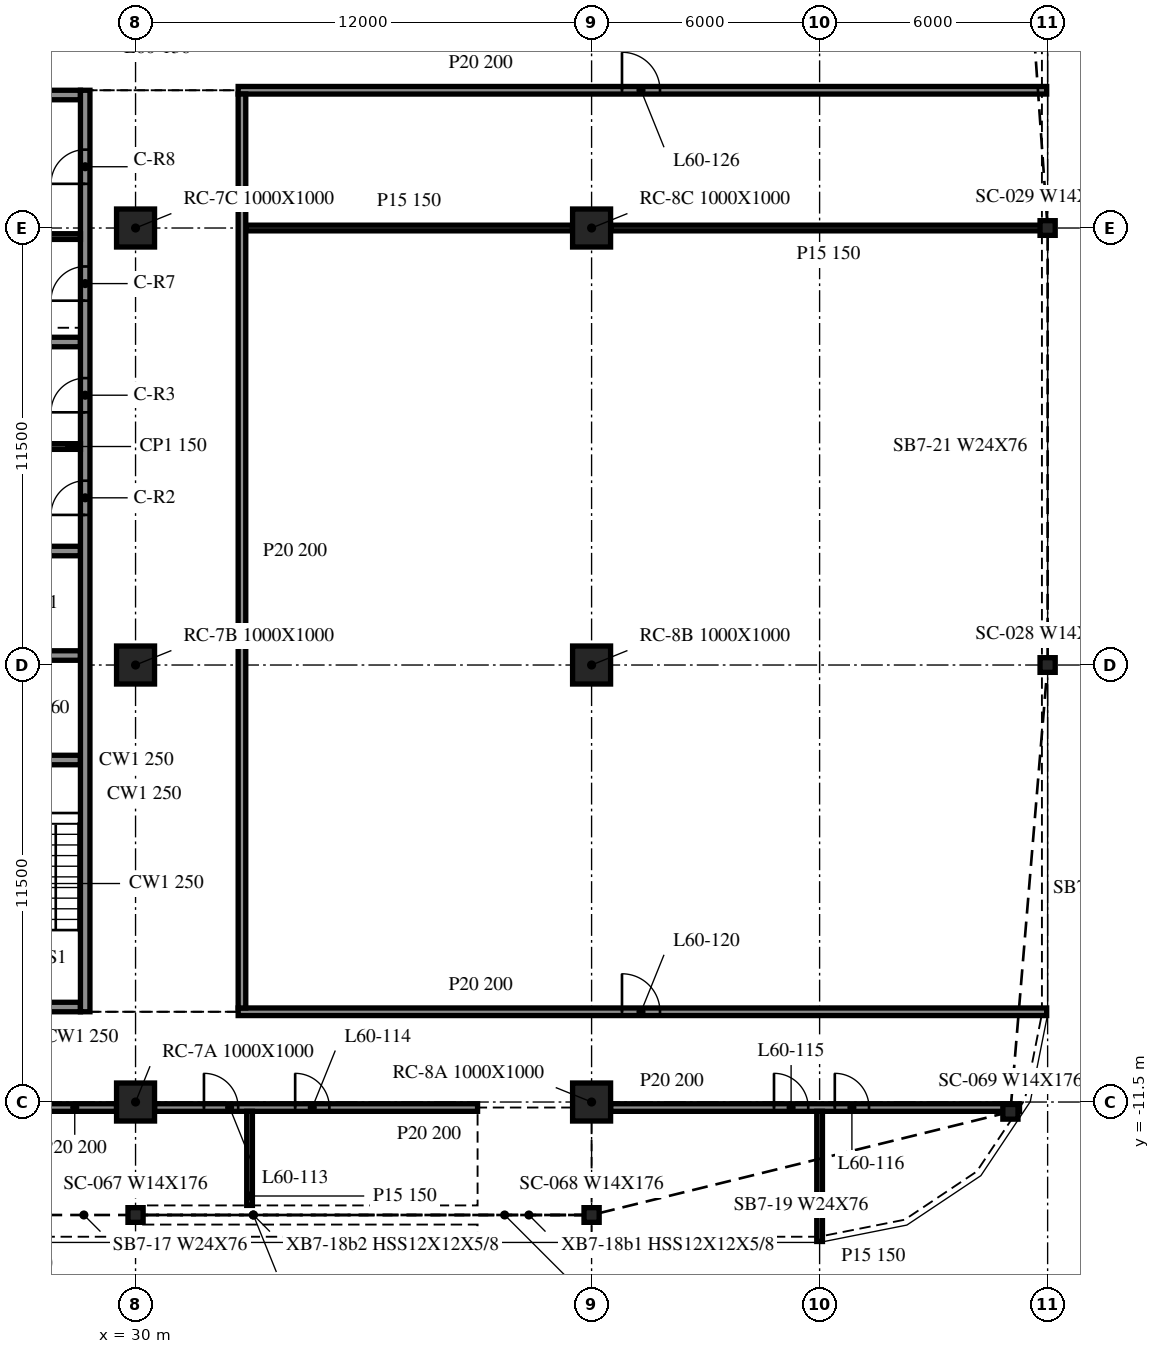
"""IFC4 building model, lengths in metres.
Left out: names, types, materials, properties, quantities, classifications, styles, units other than length and angle.
Written with IfcOpenShell. Run it as: python <this file> out.ifc"""

import sys

from ifc_helpers import new_model, si_unit, direction, frame, frame_2d, origin, origin_2d, place, context, subcontext, project, spatial, rectangle, i_section, extrude, element, fill, save


model = new_model("IFC4")
c1 = context("Model", 3, precision=1e-05, world=origin(), true_north=direction((0.0, 1.0)))
c2 = subcontext(c1, "Body", "Model", "MODEL_VIEW")
j1 = project(units=[si_unit("LENGTHUNIT", "METRE"), si_unit("PLANEANGLEUNIT", "RADIAN")], contexts=[c1])
p1 = place(None, origin())
s1 = spatial("IfcSite", under=j1, at=p1, CompositionType="ELEMENT")
p2 = place(p1, origin())
s2 = spatial("IfcBuilding", under=s1, at=p2, CompositionType="ELEMENT")
p3 = place(p2, frame((0.0, 0.0, 247.6)))
s3 = spatial("IfcBuildingStorey", under=s2, at=p3, CompositionType="ELEMENT", Elevation=247.6)
for number, where, z_axis, x_axis in (
    (1, (30.0, -11.5, -0.34), (0.0, 0.0, 1.0), (1.0, 0.0, 0.0)),
    (2, (30.0, 0.0, -0.34), (0.0, 0.0, 1.0), (1.0, 0.0, 0.0)),
    (3, (30.0, 11.5, -0.34), (0.0, 0.0, 1.0), (1.0, 0.0, 0.0)),
    (4, (42.0, -11.5, -0.34), (0.0, 0.0, 1.0), (1.0, 0.0, 0.0)),
    (5, (42.0, 0.0, -0.34), (0.0, 0.0, 1.0), (1.0, 0.0, 0.0)),
    (6, (42.0, 11.5, -0.34), (0.0, 0.0, 1.0), (1.0, 0.0, 0.0)),
):
    element("IfcColumn", number, at=place(p3, frame(where, z_axis=z_axis, x_axis=x_axis)), inside=s3, PredefinedType="COLUMN", context=c2, shape_type="SweptSolid", body=[
        extrude(rectangle(XDim=1.0, YDim=1.0, at=origin_2d()), origin(), (0.0, 0.0, 1.0), 3.8),
    ])
for number, where, z_axis, x_axis in (
    (7, (30.0, -14.473, -0.34), (0.0, 0.0, 1.0), (1.0, 0.0, 0.0)),
    (8, (42.0, -14.473, -0.34), (0.0, 0.0, 1.0), (1.0, 0.0, 0.0)),
    (9, (53.021, -11.758, -0.34), (0.0, 0.0, 1.0), (1.0, 0.0, 0.0)),
    (10, (54.0, 0.0, -0.34), (0.0, 0.0, 1.0), (1.0, 0.0, 0.0)),
    (11, (54.0, 11.5, -0.34), (0.0, 0.0, 1.0), (1.0, 0.0, 0.0)),
):
    element("IfcColumn", number, at=place(p3, frame(where, z_axis=z_axis, x_axis=x_axis)), inside=s3, PredefinedType="COLUMN", context=c2, shape_type="SweptSolid", body=[
        extrude(i_section(OverallWidth=0.399, OverallDepth=0.386, WebThickness=0.021, FlangeThickness=0.033, at=origin_2d()), origin(), (0.0, 0.0, 1.0), 3.8),
    ])
p4 = place(p3, frame((28.675, -9.125, 0.0), z_axis=(0.0, 0.0, 1.0), x_axis=(0.0, 1.0, 0.0)))
e12 = element("IfcWall", 12, at=p4, inside=s3, PredefinedType="SOLIDWALL", context=c2, shape_type="SweptSolid", body=[
    extrude(rectangle(XDim=24.25, YDim=0.25, at=frame_2d((12.125, 0.0))), origin(), (0.0, 0.0, 1.0), 3.46),
])
p5 = place(p4, frame((13.075, 0.0, 0.0)))
e13 = element("IfcOpeningElement", 13, at=p5, cuts=e12, PredefinedType="OPENING", context=c2, shape_type="SweptSolid", body=[
    extrude(rectangle(XDim=0.9, YDim=2.1, at=frame_2d((0.45, 1.05))), frame((0.0, 0.135, 0.0), z_axis=(0.0, -1.0, 0.0), x_axis=(1.0, 0.0, 0.0)), (0.0, 0.0, 1.0), 0.27),
])
p6 = place(p4, frame((15.775, 0.0, 0.0)))
e14 = element("IfcOpeningElement", 14, at=p6, cuts=e12, PredefinedType="OPENING", context=c2, shape_type="SweptSolid", body=[
    extrude(rectangle(XDim=0.9, YDim=2.1, at=frame_2d((0.45, 1.05))), frame((0.0, 0.135, 0.0), z_axis=(0.0, -1.0, 0.0), x_axis=(1.0, 0.0, 0.0)), (0.0, 0.0, 1.0), 0.27),
])
p7 = place(p4, frame((18.712, 0.0, 0.0)))
e15 = element("IfcOpeningElement", 15, at=p7, cuts=e12, PredefinedType="OPENING", context=c2, shape_type="SweptSolid", body=[
    extrude(rectangle(XDim=0.9, YDim=2.1, at=frame_2d((0.45, 1.05))), frame((0.0, 0.135, 0.0), z_axis=(0.0, -1.0, 0.0), x_axis=(1.0, 0.0, 0.0)), (0.0, 0.0, 1.0), 0.27),
])
p8 = place(p4, frame((21.788, 0.0, 0.0)))
e16 = element("IfcOpeningElement", 16, at=p8, cuts=e12, PredefinedType="OPENING", context=c2, shape_type="SweptSolid", body=[
    extrude(rectangle(XDim=0.9, YDim=2.1, at=frame_2d((0.45, 1.05))), frame((0.0, 0.135, 0.0), z_axis=(0.0, -1.0, 0.0), x_axis=(1.0, 0.0, 0.0)), (0.0, 0.0, 1.0), 0.27),
])
p9 = place(p3, frame((28.55, -9.0, 0.0), z_axis=(0.0, 0.0, 1.0), x_axis=(-1.0, 0.0, 0.0)))
e17 = element("IfcWall", 17, at=p9, inside=s3, PredefinedType="SOLIDWALL", context=c2, shape_type="SweptSolid", body=[
    extrude(rectangle(XDim=9.1, YDim=0.25, at=frame_2d((4.55, 0.0))), origin(), (0.0, 0.0, 1.0), 3.46),
])
p10 = place(p9, frame((3.65, 0.0, 0.0)))
e18 = element("IfcOpeningElement", 18, at=p10, cuts=e17, PredefinedType="OPENING", context=c2, shape_type="SweptSolid", body=[
    extrude(rectangle(XDim=1.8, YDim=2.1, at=frame_2d((0.9, 1.05))), frame((0.0, 0.135, 0.0), z_axis=(0.0, -1.0, 0.0), x_axis=(1.0, 0.0, 0.0)), (0.0, 0.0, 1.0), 0.27),
])
p11 = place(p3, frame((19.45, 15.0, 0.0), z_axis=(0.0, 0.0, 1.0), x_axis=(1.0, 0.0, 0.0)))
e19 = element("IfcWall", 19, at=p11, inside=s3, PredefinedType="SOLIDWALL", context=c2, shape_type="SweptSolid", body=[
    extrude(rectangle(XDim=9.1, YDim=0.25, at=frame_2d((4.55, 0.0))), origin(), (0.0, 0.0, 1.0), 3.46),
])
p12 = place(p11, frame((3.65, 0.0, 0.0)))
e20 = element("IfcOpeningElement", 20, at=p12, cuts=e19, PredefinedType="OPENING", context=c2, shape_type="SweptSolid", body=[
    extrude(rectangle(XDim=1.8, YDim=2.1, at=frame_2d((0.9, 1.05))), frame((0.0, 0.135, 0.0), z_axis=(0.0, -1.0, 0.0), x_axis=(1.0, 0.0, 0.0)), (0.0, 0.0, 1.0), 0.27),
])
for number, where, z_axis, x_axis in (
    (21, (25.7, -2.5, 0.0), (0.0, 0.0, 1.0), (1.0, 0.0, 0.0)),
    (22, (25.7, 0.25, 0.0), (0.0, 0.0, 1.0), (1.0, 0.0, 0.0)),
    (23, (25.7, 3.0, 0.0), (0.0, 0.0, 1.0), (1.0, 0.0, 0.0)),
    (24, (25.7, 8.5, 0.0), (0.0, 0.0, 1.0), (1.0, 0.0, 0.0)),
):
    element("IfcWall", number, at=place(p3, frame(where, z_axis=z_axis, x_axis=x_axis)), inside=s3, PredefinedType="SOLIDWALL", context=c2, shape_type="SweptSolid", body=[
        extrude(rectangle(XDim=2.85, YDim=0.25, at=frame_2d((1.425, 0.0))), origin(), (0.0, 0.0, 1.0), 3.46),
    ])
for number, where, z_axis, x_axis in (
    (25, (25.7, 5.75, 0.0), (0.0, 0.0, 1.0), (1.0, 0.0, 0.0)),
    (26, (25.7, 11.275, 0.0), (0.0, 0.0, 1.0), (1.0, 0.0, 0.0)),
):
    element("IfcWall", number, at=place(p3, frame(where, z_axis=z_axis, x_axis=x_axis)), inside=s3, PredefinedType="PARTITIONING", context=c2, shape_type="SweptSolid", body=[
        extrude(rectangle(XDim=2.85, YDim=0.15, at=frame_2d((1.425, 0.0))), origin(), (0.0, 0.0, 1.0), 3.46),
    ])
p13 = place(p3, frame((18.5, -11.645, 0.0), z_axis=(0.0, 0.0, 1.0), x_axis=(1.0, 0.0, 0.0)))
e27 = element("IfcWall", 27, at=p13, inside=s3, PredefinedType="PARTITIONING", context=c2, shape_type="SweptSolid", body=[
    extrude(rectangle(XDim=11.0, YDim=0.2, at=frame_2d((5.5, 0.0))), origin(), (0.0, 0.0, 1.0), 3.46),
])
p14 = place(p13, frame((1.3, 0.0, 0.0)))
e28 = element("IfcOpeningElement", 28, at=p14, cuts=e27, PredefinedType="OPENING", context=c2, shape_type="SweptSolid", body=[
    extrude(rectangle(XDim=0.9, YDim=2.1, at=frame_2d((0.45, 1.05))), frame((0.0, 0.11, 0.0), z_axis=(0.0, -1.0, 0.0), x_axis=(1.0, 0.0, 0.0)), (0.0, 0.0, 1.0), 0.22),
])
p15 = place(p13, frame((5.1, 0.0, 0.0)))
e29 = element("IfcOpeningElement", 29, at=p15, cuts=e27, PredefinedType="OPENING", context=c2, shape_type="SweptSolid", body=[
    extrude(rectangle(XDim=0.9, YDim=2.1, at=frame_2d((0.45, 1.05))), frame((0.0, 0.11, 0.0), z_axis=(0.0, -1.0, 0.0), x_axis=(1.0, 0.0, 0.0)), (0.0, 0.0, 1.0), 0.22),
])
p16 = place(p3, frame((30.5, -11.645, 0.0), z_axis=(0.0, 0.0, 1.0), x_axis=(1.0, 0.0, 0.0)))
e30 = element("IfcWall", 30, at=p16, inside=s3, PredefinedType="PARTITIONING", context=c2, shape_type="SweptSolid", body=[
    extrude(rectangle(XDim=8.5, YDim=0.2, at=frame_2d((4.25, 0.0))), origin(), (0.0, 0.0, 1.0), 3.46),
])
p17 = place(p16, frame((1.3, 0.0, 0.0)))
e31 = element("IfcOpeningElement", 31, at=p17, cuts=e30, PredefinedType="OPENING", context=c2, shape_type="SweptSolid", body=[
    extrude(rectangle(XDim=0.9, YDim=2.1, at=frame_2d((0.45, 1.05))), frame((0.0, 0.11, 0.0), z_axis=(0.0, -1.0, 0.0), x_axis=(1.0, 0.0, 0.0)), (0.0, 0.0, 1.0), 0.22),
])
p18 = place(p16, frame((3.7, 0.0, 0.0)))
e32 = element("IfcOpeningElement", 32, at=p18, cuts=e30, PredefinedType="OPENING", context=c2, shape_type="SweptSolid", body=[
    extrude(rectangle(XDim=0.9, YDim=2.1, at=frame_2d((0.45, 1.05))), frame((0.0, 0.11, 0.0), z_axis=(0.0, -1.0, 0.0), x_axis=(1.0, 0.0, 0.0)), (0.0, 0.0, 1.0), 0.22),
])
p19 = place(p3, frame((42.5, -11.645, 0.0), z_axis=(0.0, 0.0, 1.0), x_axis=(1.0, 0.0, 0.0)))
e33 = element("IfcWall", 33, at=p19, inside=s3, PredefinedType="PARTITIONING", context=c2, shape_type="SweptSolid", body=[
    extrude(rectangle(XDim=10.76, YDim=0.2, at=frame_2d((5.38, 0.0))), origin(), (0.0, 0.0, 1.0), 3.46),
])
p20 = place(p19, frame((4.3, 0.0, 0.0)))
e34 = element("IfcOpeningElement", 34, at=p20, cuts=e33, PredefinedType="OPENING", context=c2, shape_type="SweptSolid", body=[
    extrude(rectangle(XDim=0.9, YDim=2.1, at=frame_2d((0.45, 1.05))), frame((0.0, 0.11, 0.0), z_axis=(0.0, -1.0, 0.0), x_axis=(1.0, 0.0, 0.0)), (0.0, 0.0, 1.0), 0.22),
])
p21 = place(p19, frame((5.9, 0.0, 0.0)))
e35 = element("IfcOpeningElement", 35, at=p21, cuts=e33, PredefinedType="OPENING", context=c2, shape_type="SweptSolid", body=[
    extrude(rectangle(XDim=0.9, YDim=2.1, at=frame_2d((0.45, 1.05))), frame((0.0, 0.11, 0.0), z_axis=(0.0, -1.0, 0.0), x_axis=(1.0, 0.0, 0.0)), (0.0, 0.0, 1.0), 0.22),
])
p22 = place(p3, frame((32.7, -9.125, 0.0), z_axis=(0.0, 0.0, 1.0), x_axis=(1.0, 0.0, 0.0)))
e36 = element("IfcWall", 36, at=p22, inside=s3, PredefinedType="PARTITIONING", context=c2, shape_type="SweptSolid", body=[
    extrude(rectangle(XDim=21.275, YDim=0.2, at=frame_2d((10.638, 0.0))), origin(), (0.0, 0.0, 1.0), 3.46),
])
p23 = place(p22, frame((10.1, 0.0, 0.0)))
e37 = element("IfcOpeningElement", 37, at=p23, cuts=e36, PredefinedType="OPENING", context=c2, shape_type="SweptSolid", body=[
    extrude(rectangle(XDim=1.0, YDim=2.1, at=frame_2d((0.5, 1.05))), frame((0.0, 0.11, 0.0), z_axis=(0.0, -1.0, 0.0), x_axis=(1.0, 0.0, 0.0)), (0.0, 0.0, 1.0), 0.22),
])
p24 = place(p3, frame((32.9, 11.5, 0.0), z_axis=(0.0, 0.0, 1.0), x_axis=(1.0, 0.0, 0.0)))
e38 = element("IfcWall", 38, at=p24, inside=s3, PredefinedType="PARTITIONING", context=c2, shape_type="SweptSolid", body=[
    extrude(rectangle(XDim=8.6, YDim=0.15, at=frame_2d((4.3, 0.0))), origin(), (0.0, 0.0, 1.0), 3.46),
])
p25 = place(p3, frame((42.5, 11.5, 0.0), z_axis=(0.0, 0.0, 1.0), x_axis=(1.0, 0.0, 0.0)))
e39 = element("IfcWall", 39, at=p25, inside=s3, PredefinedType="PARTITIONING", context=c2, shape_type="SweptSolid", body=[
    extrude(rectangle(XDim=11.475, YDim=0.15, at=frame_2d((5.738, 0.0))), origin(), (0.0, 0.0, 1.0), 3.46),
])
p26 = place(p3, frame((32.7, 15.125, 0.0), z_axis=(0.0, 0.0, 1.0), x_axis=(1.0, 0.0, 0.0)))
e40 = element("IfcWall", 40, at=p26, inside=s3, PredefinedType="PARTITIONING", context=c2, shape_type="SweptSolid", body=[
    extrude(rectangle(XDim=21.275, YDim=0.2, at=frame_2d((10.638, 0.0))), origin(), (0.0, 0.0, 1.0), 3.46),
])
p27 = place(p26, frame((10.1, 0.0, 0.0)))
e41 = element("IfcOpeningElement", 41, at=p27, cuts=e40, PredefinedType="OPENING", context=c2, shape_type="SweptSolid", body=[
    extrude(rectangle(XDim=1.0, YDim=2.1, at=frame_2d((0.5, 1.05))), frame((0.0, 0.11, 0.0), z_axis=(0.0, -1.0, 0.0), x_axis=(1.0, 0.0, 0.0)), (0.0, 0.0, 1.0), 0.22),
])
p28 = place(p3, frame((32.8, -9.025, 0.0), z_axis=(0.0, 0.0, 1.0), x_axis=(0.0, 1.0, 0.0)))
e42 = element("IfcWall", 42, at=p28, inside=s3, PredefinedType="PARTITIONING", context=c2, shape_type="SweptSolid", body=[
    extrude(rectangle(XDim=24.05, YDim=0.2, at=frame_2d((12.025, 0.0))), origin(), (0.0, 0.0, 1.0), 3.46),
])
p29 = place(p3, frame((33.0, -14.221, 0.0), z_axis=(0.0, 0.0, 1.0), x_axis=(0.0, 1.0, 0.0)))
e43 = element("IfcWall", 43, at=p29, inside=s3, PredefinedType="PARTITIONING", context=c2, shape_type="SweptSolid", body=[
    extrude(rectangle(XDim=2.476, YDim=0.15, at=frame_2d((1.238, 0.0))), origin(), (0.0, 0.0, 1.0), 3.46),
])
p30 = place(p3, frame((48.0, -15.17, 0.0), z_axis=(0.0, 0.0, 1.0), x_axis=(0.0, 1.0, 0.0)))
e44 = element("IfcWall", 44, at=p30, inside=s3, PredefinedType="PARTITIONING", context=c2, shape_type="SweptSolid", body=[
    extrude(rectangle(XDim=3.425, YDim=0.15, at=frame_2d((1.712, 0.0))), origin(), (0.0, 0.0, 1.0), 3.46),
])
p31 = place(p5, origin())
e45 = element("IfcDoor", 45, at=p31, inside=s3, OperationType="SINGLE_SWING_RIGHT", PredefinedType="DOOR", context=c2, shape_type="SweptSolid", body=[
    extrude(rectangle(XDim=0.9, YDim=2.1, at=frame_2d((0.45, 1.05))), frame((0.0, 0.025, 0.0), z_axis=(0.0, -1.0, 0.0), x_axis=(1.0, 0.0, 0.0)), (0.0, 0.0, 1.0), 0.05),
])
fill(e13, e45)
p32 = place(p6, origin())
e46 = element("IfcDoor", 46, at=p32, inside=s3, OperationType="SINGLE_SWING_LEFT", PredefinedType="DOOR", context=c2, shape_type="SweptSolid", body=[
    extrude(rectangle(XDim=0.9, YDim=2.1, at=frame_2d((0.45, 1.05))), frame((0.0, 0.025, 0.0), z_axis=(0.0, -1.0, 0.0), x_axis=(1.0, 0.0, 0.0)), (0.0, 0.0, 1.0), 0.05),
])
fill(e14, e46)
p33 = place(p7, origin())
e47 = element("IfcDoor", 47, at=p33, inside=s3, OperationType="SINGLE_SWING_LEFT", PredefinedType="DOOR", context=c2, shape_type="SweptSolid", body=[
    extrude(rectangle(XDim=0.9, YDim=2.1, at=frame_2d((0.45, 1.05))), frame((0.0, 0.025, 0.0), z_axis=(0.0, -1.0, 0.0), x_axis=(1.0, 0.0, 0.0)), (0.0, 0.0, 1.0), 0.05),
])
fill(e15, e47)
p34 = place(p8, origin())
e48 = element("IfcDoor", 48, at=p34, inside=s3, OperationType="SINGLE_SWING_RIGHT", PredefinedType="DOOR", context=c2, shape_type="SweptSolid", body=[
    extrude(rectangle(XDim=0.9, YDim=2.1, at=frame_2d((0.45, 1.05))), frame((0.0, 0.025, 0.0), z_axis=(0.0, -1.0, 0.0), x_axis=(1.0, 0.0, 0.0)), (0.0, 0.0, 1.0), 0.05),
])
fill(e16, e48)
p35 = place(p17, origin())
e49 = element("IfcDoor", 49, at=p35, inside=s3, OperationType="SINGLE_SWING_RIGHT", PredefinedType="DOOR", context=c2, shape_type="SweptSolid", body=[
    extrude(rectangle(XDim=0.9, YDim=2.1, at=frame_2d((0.45, 1.05))), frame((0.0, 0.025, 0.0), z_axis=(0.0, -1.0, 0.0), x_axis=(1.0, 0.0, 0.0)), (0.0, 0.0, 1.0), 0.05),
])
fill(e31, e49)
p36 = place(p18, origin())
e50 = element("IfcDoor", 50, at=p36, inside=s3, OperationType="SINGLE_SWING_RIGHT", PredefinedType="DOOR", context=c2, shape_type="SweptSolid", body=[
    extrude(rectangle(XDim=0.9, YDim=2.1, at=frame_2d((0.45, 1.05))), frame((0.0, 0.025, 0.0), z_axis=(0.0, -1.0, 0.0), x_axis=(1.0, 0.0, 0.0)), (0.0, 0.0, 1.0), 0.05),
])
fill(e32, e50)
p37 = place(p20, origin())
e51 = element("IfcDoor", 51, at=p37, inside=s3, OperationType="SINGLE_SWING_RIGHT", PredefinedType="DOOR", context=c2, shape_type="SweptSolid", body=[
    extrude(rectangle(XDim=0.9, YDim=2.1, at=frame_2d((0.45, 1.05))), frame((0.0, 0.025, 0.0), z_axis=(0.0, -1.0, 0.0), x_axis=(1.0, 0.0, 0.0)), (0.0, 0.0, 1.0), 0.05),
])
fill(e34, e51)
p38 = place(p21, origin())
e52 = element("IfcDoor", 52, at=p38, inside=s3, OperationType="SINGLE_SWING_LEFT", PredefinedType="DOOR", context=c2, shape_type="SweptSolid", body=[
    extrude(rectangle(XDim=0.9, YDim=2.1, at=frame_2d((0.45, 1.05))), frame((0.0, 0.025, 0.0), z_axis=(0.0, -1.0, 0.0), x_axis=(1.0, 0.0, 0.0)), (0.0, 0.0, 1.0), 0.05),
])
fill(e35, e52)
p39 = place(p23, origin())
e53 = element("IfcDoor", 53, at=p39, inside=s3, OperationType="SINGLE_SWING_RIGHT", PredefinedType="DOOR", context=c2, shape_type="SweptSolid", body=[
    extrude(rectangle(XDim=1.0, YDim=2.1, at=frame_2d((0.5, 1.05))), frame((0.0, 0.025, 0.0), z_axis=(0.0, -1.0, 0.0), x_axis=(1.0, 0.0, 0.0)), (0.0, 0.0, 1.0), 0.05),
])
fill(e37, e53)
p40 = place(p27, origin())
e54 = element("IfcDoor", 54, at=p40, inside=s3, OperationType="SINGLE_SWING_LEFT", PredefinedType="DOOR", context=c2, shape_type="SweptSolid", body=[
    extrude(rectangle(XDim=1.0, YDim=2.1, at=frame_2d((0.5, 1.05))), frame((0.0, 0.025, 0.0), z_axis=(0.0, -1.0, 0.0), x_axis=(1.0, 0.0, 0.0)), (0.0, 0.0, 1.0), 0.05),
])
fill(e41, e54)
save(model, sys.argv[1])
